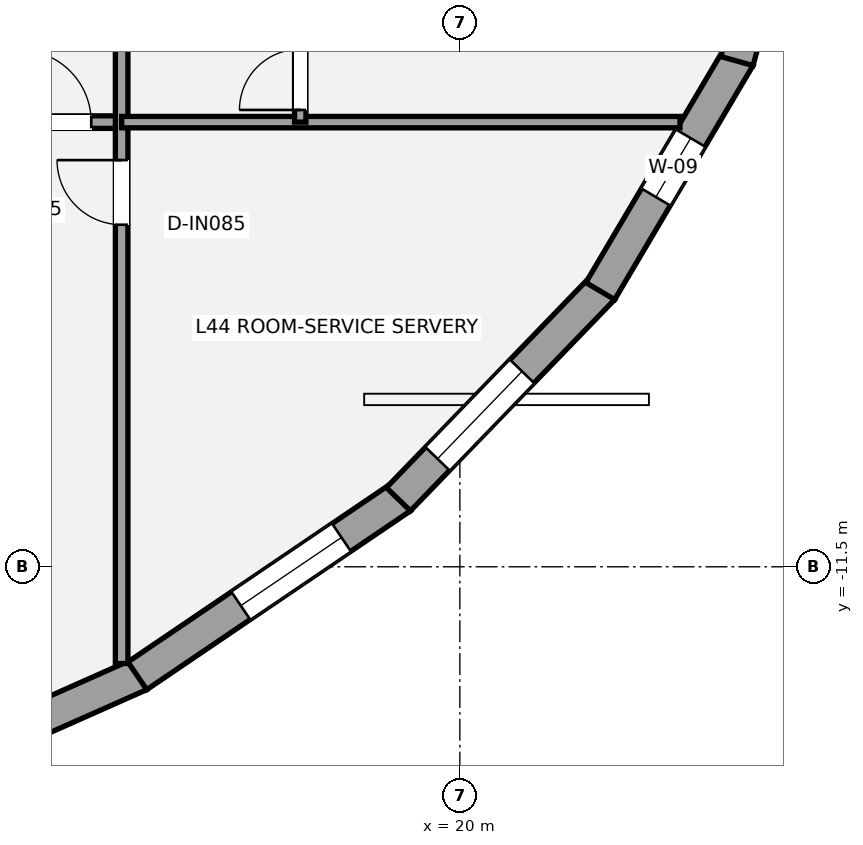
"""IFC4 building model, lengths in metres.
Left out: names, types, materials, properties, quantities, classifications, styles, units other than length and angle.
Written with IfcOpenShell. Run it as: python <this file> out.ifc"""

import sys

from ifc_helpers import new_model, si_unit, direction, frame, frame_2d, origin, place, context, subcontext, project, spatial, rectangle, extrude, element, fill, save


model = new_model("IFC4")
c1 = context("Model", 3, precision=1e-05, world=origin(), true_north=direction((0.0, 1.0)))
c2 = subcontext(c1, "Body", "Model", "MODEL_VIEW")
j1 = project(units=[si_unit("LENGTHUNIT", "METRE"), si_unit("PLANEANGLEUNIT", "RADIAN")], contexts=[c1])
p1 = place(None, origin())
s1 = spatial("IfcSite", under=j1, at=p1, CompositionType="ELEMENT")
p2 = place(p1, origin())
s2 = spatial("IfcBuilding", under=s1, at=p2, CompositionType="ELEMENT")
p3 = place(p2, frame((0.0, 0.0, 163.0)))
s3 = spatial("IfcBuildingStorey", under=s2, at=p3, CompositionType="ELEMENT", Elevation=163.0)
p4 = place(p3, frame((15.791, -12.916, 0.0), z_axis=(0.0, 0.0, 1.0), x_axis=(-0.913907994914, -0.405921392431, 0.0)))
e1 = element("IfcWall", 1, at=p4, inside=s3, PredefinedType="STANDARD", context=c2, shape_type="SweptSolid", body=[
    extrude(rectangle(XDim=4.487, YDim=0.44, at=frame_2d((2.244, 0.0))), origin(), (0.0, 0.0, 1.0), 2.315),
])
p5 = place(p4, frame((1.692, 0.0, 0.58)))
e2 = element("IfcOpeningElement", 2, at=p5, cuts=e1, PredefinedType="OPENING", context=c2, shape_type="SweptSolid", body=[
    extrude(rectangle(XDim=1.6, YDim=1.55, at=frame_2d((0.8, 0.775))), frame((0.0, 0.23, 0.0), z_axis=(0.0, -1.0, 0.0), x_axis=(1.0, 0.0, 0.0)), (0.0, 0.0, 1.0), 0.46),
])
p6 = place(p3, frame((19.227, -10.583, 0.0), z_axis=(0.0, 0.0, 1.0), x_axis=(-0.827760762475, -0.561081206338, 0.0)))
e3 = element("IfcWall", 3, at=p6, inside=s3, PredefinedType="STANDARD", context=c2, shape_type="SweptSolid", body=[
    extrude(rectangle(XDim=4.192, YDim=0.44, at=frame_2d((2.096, 0.0))), origin(), (0.0, 0.0, 1.0), 2.315),
])
p7 = place(p6, frame((0.947, 0.0, 0.58)))
e4 = element("IfcOpeningElement", 4, at=p7, cuts=e3, PredefinedType="OPENING", context=c2, shape_type="SweptSolid", body=[
    extrude(rectangle(XDim=1.6, YDim=1.55, at=frame_2d((0.8, 0.775))), frame((0.0, 0.23, 0.0), z_axis=(0.0, -1.0, 0.0), x_axis=(1.0, 0.0, 0.0)), (0.0, 0.0, 1.0), 0.46),
])
p8 = place(p3, frame((21.879, -7.832, 0.0), z_axis=(0.0, 0.0, 1.0), x_axis=(-0.694975307772, -0.719033602544, 0.0)))
e5 = element("IfcWall", 5, at=p8, inside=s3, PredefinedType="STANDARD", context=c2, shape_type="SweptSolid", body=[
    extrude(rectangle(XDim=3.866, YDim=0.44, at=frame_2d((1.933, 0.0))), origin(), (0.0, 0.0, 1.0), 2.315),
])
p9 = place(p8, frame((1.526, 0.0, 0.58)))
e6 = element("IfcOpeningElement", 6, at=p9, cuts=e5, PredefinedType="OPENING", context=c2, shape_type="SweptSolid", body=[
    extrude(rectangle(XDim=1.6, YDim=1.55, at=frame_2d((0.8, 0.775))), frame((0.0, 0.23, 0.0), z_axis=(0.0, -1.0, 0.0), x_axis=(1.0, 0.0, 0.0)), (0.0, 0.0, 1.0), 0.46),
])
p10 = place(p3, frame((23.667, -4.794, 0.0), z_axis=(0.0, 0.0, 1.0), x_axis=(-0.508883387051, -0.860835465338, 0.0)))
e7 = element("IfcWall", 7, at=p10, inside=s3, PredefinedType="STANDARD", context=c2, shape_type="SweptSolid", body=[
    extrude(rectangle(XDim=3.577, YDim=0.44, at=frame_2d((1.788, 0.0))), origin(), (0.0, 0.0, 1.0), 2.315),
])
p11 = place(p10, frame((1.239, 0.0, 0.58)))
e8 = element("IfcOpeningElement", 8, at=p11, cuts=e7, PredefinedType="OPENING", context=c2, shape_type="SweptSolid", body=[
    extrude(rectangle(XDim=0.9, YDim=1.35, at=frame_2d((0.45, 0.675))), frame((0.0, 0.23, 0.0), z_axis=(0.0, -1.0, 0.0), x_axis=(1.0, 0.0, 0.0)), (0.0, 0.0, 1.0), 0.46),
])
p12 = place(p3, frame((24.554, -1.594, 0.0), z_axis=(0.0, 0.0, 1.0), x_axis=(-0.269235699479, -0.963074315993, 0.0)))
e9 = element("IfcWall", 9, at=p12, inside=s3, PredefinedType="STANDARD", context=c2, shape_type="SweptSolid", body=[
    extrude(rectangle(XDim=3.377, YDim=0.44, at=frame_2d((1.688, 0.0))), origin(), (0.0, 0.0, 1.0), 2.315),
])
p13 = place(p12, frame((1.429, 0.0, 0.58)))
e10 = element("IfcOpeningElement", 10, at=p13, cuts=e9, PredefinedType="OPENING", context=c2, shape_type="SweptSolid", body=[
    extrude(rectangle(XDim=1.6, YDim=1.55, at=frame_2d((0.8, 0.775))), frame((0.0, 0.23, 0.0), z_axis=(0.0, -1.0, 0.0), x_axis=(1.0, 0.0, 0.0)), (0.0, 0.0, 1.0), 0.46),
])
p14 = place(p3, frame((-15.95, -5.65, 0.0), z_axis=(0.0, 0.0, 1.0), x_axis=(1.0, 0.0, 0.0)))
e11 = element("IfcWall", 11, at=p14, inside=s3, PredefinedType="PARTITIONING", context=c2, shape_type="SweptSolid", body=[
    extrude(rectangle(XDim=31.5, YDim=0.165, at=frame_2d((15.75, 0.0))), origin(), (0.0, 0.0, 1.0), 2.398),
])
p15 = place(p14, frame((4.8, 0.0, 0.0)))
e12 = element("IfcOpeningElement", 12, at=p15, cuts=e11, PredefinedType="OPENING", context=c2, shape_type="SweptSolid", body=[
    extrude(rectangle(XDim=0.95, YDim=2.15, at=frame_2d((0.475, 1.075))), frame((0.0, 0.093, 0.0), z_axis=(0.0, -1.0, 0.0), x_axis=(1.0, 0.0, 0.0)), (0.0, 0.0, 1.0), 0.185),
])
p16 = place(p14, frame((12.8, 0.0, 0.0)))
e13 = element("IfcOpeningElement", 13, at=p16, cuts=e11, PredefinedType="OPENING", context=c2, shape_type="SweptSolid", body=[
    extrude(rectangle(XDim=0.95, YDim=2.15, at=frame_2d((0.475, 1.075))), frame((0.0, 0.093, 0.0), z_axis=(0.0, -1.0, 0.0), x_axis=(1.0, 0.0, 0.0)), (0.0, 0.0, 1.0), 0.185),
])
p17 = place(p14, frame((20.8, 0.0, 0.0)))
e14 = element("IfcOpeningElement", 14, at=p17, cuts=e11, PredefinedType="OPENING", context=c2, shape_type="SweptSolid", body=[
    extrude(rectangle(XDim=0.95, YDim=2.15, at=frame_2d((0.475, 1.075))), frame((0.0, 0.093, 0.0), z_axis=(0.0, -1.0, 0.0), x_axis=(1.0, 0.0, 0.0)), (0.0, 0.0, 1.0), 0.185),
])
p18 = place(p14, frame((30.15, 0.0, 0.0)))
e15 = element("IfcOpeningElement", 15, at=p18, cuts=e11, PredefinedType="OPENING", context=c2, shape_type="SweptSolid", body=[
    extrude(rectangle(XDim=0.95, YDim=2.15, at=frame_2d((0.475, 1.075))), frame((0.0, 0.093, 0.0), z_axis=(0.0, -1.0, 0.0), x_axis=(1.0, 0.0, 0.0)), (0.0, 0.0, 1.0), 0.185),
])
p19 = place(p3, frame((15.55, -12.773, 0.0), z_axis=(0.0, 0.0, 1.0), x_axis=(0.0, 1.0, 0.0)))
e16 = element("IfcWall", 16, at=p19, inside=s3, PredefinedType="PARTITIONING", context=c2, shape_type="SweptSolid", body=[
    extrude(rectangle(XDim=20.323, YDim=0.165, at=frame_2d((10.162, 0.0))), origin(), (0.0, 0.0, 1.0), 2.473),
])
p20 = place(p19, frame((5.773, 0.0, 0.0)))
e17 = element("IfcOpeningElement", 17, at=p20, cuts=e16, PredefinedType="OPENING", context=c2, shape_type="SweptSolid", body=[
    extrude(rectangle(XDim=0.85, YDim=2.1, at=frame_2d((0.425, 1.05))), frame((0.0, 0.093, 0.0), z_axis=(0.0, -1.0, 0.0), x_axis=(1.0, 0.0, 0.0)), (0.0, 0.0, 1.0), 0.185),
])
p21 = place(p19, frame((9.823, 0.0, 0.0)))
e18 = element("IfcOpeningElement", 18, at=p21, cuts=e16, PredefinedType="OPENING", context=c2, shape_type="SweptSolid", body=[
    extrude(rectangle(XDim=0.95, YDim=2.15, at=frame_2d((0.475, 1.075))), frame((0.0, 0.093, 0.0), z_axis=(0.0, -1.0, 0.0), x_axis=(1.0, 0.0, 0.0)), (0.0, 0.0, 1.0), 0.185),
])
p22 = place(p19, frame((14.223, 0.0, 0.0)))
e19 = element("IfcOpeningElement", 19, at=p22, cuts=e16, PredefinedType="OPENING", context=c2, shape_type="SweptSolid", body=[
    extrude(rectangle(XDim=0.95, YDim=2.15, at=frame_2d((0.475, 1.075))), frame((0.0, 0.093, 0.0), z_axis=(0.0, -1.0, 0.0), x_axis=(1.0, 0.0, 0.0)), (0.0, 0.0, 1.0), 0.185),
])
p23 = place(p19, frame((18.973, 0.0, 0.0)))
e20 = element("IfcOpeningElement", 20, at=p23, cuts=e16, PredefinedType="OPENING", context=c2, shape_type="SweptSolid", body=[
    extrude(rectangle(XDim=0.95, YDim=2.15, at=frame_2d((0.475, 1.075))), frame((0.0, 0.093, 0.0), z_axis=(0.0, -1.0, 0.0), x_axis=(1.0, 0.0, 0.0)), (0.0, 0.0, 1.0), 0.185),
])
p24 = place(p3, frame((15.55, -5.65, 0.0), z_axis=(0.0, 0.0, 1.0), x_axis=(1.0, 0.0, 0.0)))
e21 = element("IfcWall", 21, at=p24, inside=s3, PredefinedType="PLUMBINGWALL", context=c2, shape_type="SweptSolid", body=[
    extrude(rectangle(XDim=7.346, YDim=0.15, at=frame_2d((3.673, 0.0))), origin(), (0.0, 0.0, 1.0), 2.473),
])
p25 = place(p3, frame((17.9, -5.65, 0.0), z_axis=(0.0, 0.0, 1.0), x_axis=(0.0, 1.0, 0.0)))
e22 = element("IfcWall", 22, at=p25, inside=s3, PredefinedType="PLUMBINGWALL", context=c2, shape_type="SweptSolid", body=[
    extrude(rectangle(XDim=2.15, YDim=0.15, at=frame_2d((1.075, 0.0))), origin(), (0.0, 0.0, 1.0), 3.02),
])
p26 = place(p25, frame((0.16, 0.0, 0.0)))
e23 = element("IfcOpeningElement", 23, at=p26, cuts=e22, PredefinedType="OPENING", context=c2, shape_type="SweptSolid", body=[
    extrude(rectangle(XDim=0.8, YDim=2.1, at=frame_2d((0.4, 1.05))), frame((0.0, 0.085, 0.0), z_axis=(0.0, -1.0, 0.0), x_axis=(1.0, 0.0, 0.0)), (0.0, 0.0, 1.0), 0.17),
])
p27 = place(p7, origin())
e24 = element("IfcWindow", 24, at=p27, inside=s3, PartitioningType="SINGLE_PANEL", PredefinedType="WINDOW", context=c2, shape_type="SweptSolid", body=[
    extrude(rectangle(XDim=1.6, YDim=1.55, at=frame_2d((0.8, 0.775))), frame((0.0, -0.01, 0.0), z_axis=(0.0, -1.0, 0.0), x_axis=(1.0, 0.0, 0.0)), (0.0, 0.0, 1.0), 0.06),
])
fill(e4, e24)
p28 = place(p9, origin())
e25 = element("IfcWindow", 25, at=p28, inside=s3, PartitioningType="SINGLE_PANEL", PredefinedType="WINDOW", context=c2, shape_type="SweptSolid", body=[
    extrude(rectangle(XDim=1.6, YDim=1.55, at=frame_2d((0.8, 0.775))), frame((0.0, -0.01, 0.0), z_axis=(0.0, -1.0, 0.0), x_axis=(1.0, 0.0, 0.0)), (0.0, 0.0, 1.0), 0.06),
])
fill(e6, e25)
p29 = place(p11, origin())
e26 = element("IfcWindow", 26, at=p29, inside=s3, PartitioningType="SINGLE_PANEL", PredefinedType="WINDOW", context=c2, shape_type="SweptSolid", body=[
    extrude(rectangle(XDim=0.9, YDim=1.35, at=frame_2d((0.45, 0.675))), frame((0.0, -0.01, 0.0), z_axis=(0.0, -1.0, 0.0), x_axis=(1.0, 0.0, 0.0)), (0.0, 0.0, 1.0), 0.06),
])
fill(e8, e26)
p30 = place(p20, origin())
e27 = element("IfcDoor", 27, at=p30, inside=s3, OperationType="SINGLE_SWING_RIGHT", PredefinedType="DOOR", context=c2, shape_type="SweptSolid", body=[
    extrude(rectangle(XDim=0.85, YDim=2.1, at=frame_2d((0.425, 1.05))), frame((0.0, 0.025, 0.0), z_axis=(0.0, -1.0, 0.0), x_axis=(1.0, 0.0, 0.0)), (0.0, 0.0, 1.0), 0.05),
])
fill(e17, e27)
p31 = place(p18, origin())
e28 = element("IfcDoor", 28, at=p31, inside=s3, OperationType="SINGLE_SWING_LEFT", PredefinedType="DOOR", context=c2, shape_type="SweptSolid", body=[
    extrude(rectangle(XDim=0.95, YDim=2.15, at=frame_2d((0.475, 1.075))), frame((0.0, 0.025, 0.0), z_axis=(0.0, -1.0, 0.0), x_axis=(1.0, 0.0, 0.0)), (0.0, 0.0, 1.0), 0.05),
])
fill(e15, e28)
p32 = place(p26, origin())
e29 = element("IfcDoor", 29, at=p32, inside=s3, OperationType="SINGLE_SWING_LEFT", PredefinedType="DOOR", context=c2, shape_type="SweptSolid", body=[
    extrude(rectangle(XDim=0.8, YDim=2.1, at=frame_2d((0.4, 1.05))), frame((0.0, 0.025, 0.0), z_axis=(0.0, -1.0, 0.0), x_axis=(1.0, 0.0, 0.0)), (0.0, 0.0, 1.0), 0.05),
])
fill(e23, e29)
save(model, sys.argv[1])
